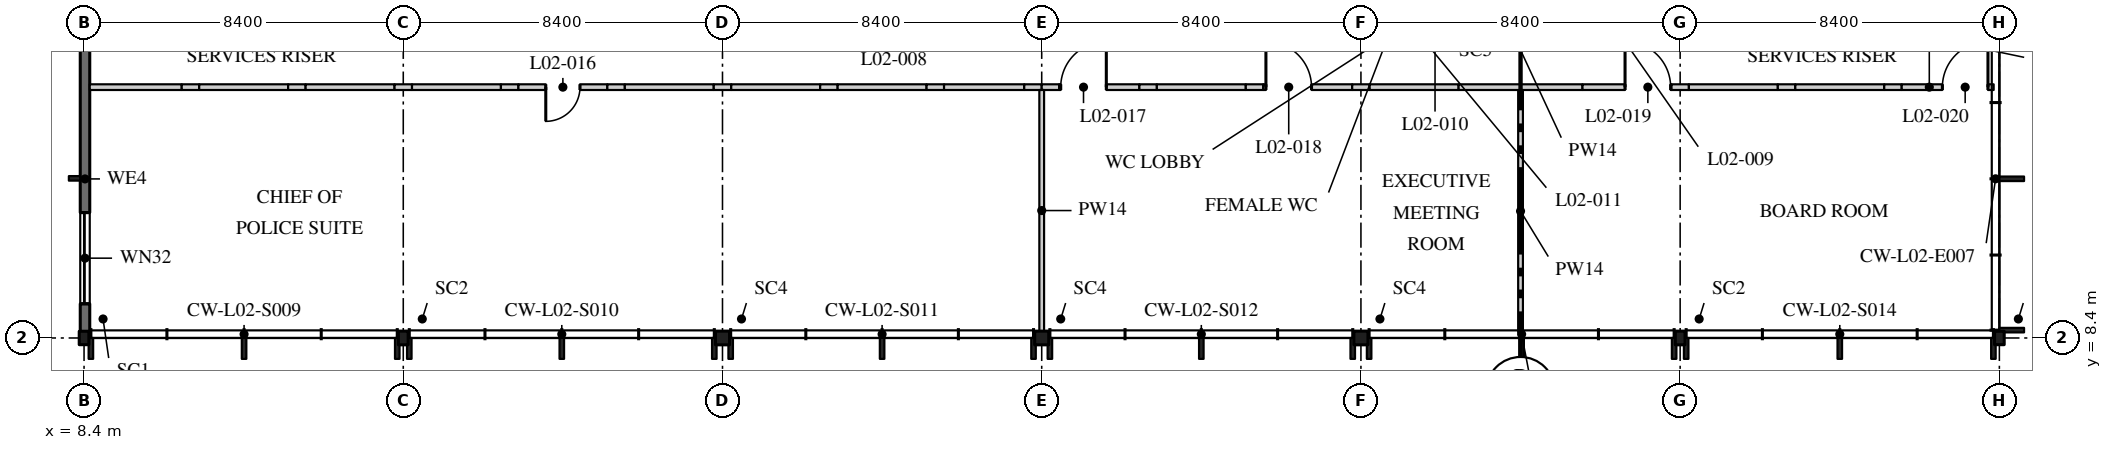
"""IFC4 building model, lengths in metres.
Left out: names, types, materials, properties, quantities, classifications, styles, units other than length and angle.
Written with IfcOpenShell. Run it as: python <this file> out.ifc"""

import sys

from ifc_helpers import new_model, si_unit, direction, frame, frame_2d, origin, origin_2d, place, context, subcontext, project, spatial, rectangle, i_section, extrude, element, fill, save


model = new_model("IFC4")
c1 = context("Model", 3, precision=1e-05, world=origin(), true_north=direction((0.0, 1.0)))
c2 = subcontext(c1, "Body", "Model", "MODEL_VIEW")
j1 = project(units=[si_unit("LENGTHUNIT", "METRE"), si_unit("PLANEANGLEUNIT", "RADIAN")], contexts=[c1])
p1 = place(None, origin())
s1 = spatial("IfcSite", under=j1, at=p1, CompositionType="ELEMENT")
p2 = place(p1, origin())
s2 = spatial("IfcBuilding", under=s1, at=p2, CompositionType="ELEMENT")
p3 = place(p2, frame((0.0, 0.0, 9.9)))
s3 = spatial("IfcBuildingStorey", under=s2, at=p3, CompositionType="ELEMENT", Elevation=9.9)
p4 = place(p3, frame((8.4, 8.4, 0.0), z_axis=(0.0, 0.0, 1.0), x_axis=(1.0, 0.0, 0.0)))
e1 = element("IfcColumn", 1, at=p4, inside=s3, PredefinedType="COLUMN", context=c2, shape_type="SweptSolid", body=[
    extrude(i_section(OverallWidth=0.254, OverallDepth=0.353, WebThickness=0.01, FlangeThickness=0.016, FilletRadius=0.015, at=origin_2d()), origin(), (0.0, 0.0, 1.0), 4.37),
])
p5 = place(p3, frame((16.8, 8.4, 0.0), z_axis=(0.0, 0.0, 1.0), x_axis=(1.0, 0.0, 0.0)))
e2 = element("IfcColumn", 2, at=p5, inside=s3, PredefinedType="COLUMN", context=c2, shape_type="SweptSolid", body=[
    extrude(i_section(OverallWidth=0.257, OverallDepth=0.361, WebThickness=0.011, FlangeThickness=0.02, FilletRadius=0.015, at=origin_2d()), origin(), (0.0, 0.0, 1.0), 4.37),
])
for number, where, z_axis, x_axis in (
    (3, (25.2, 8.4, 0.0), (0.0, 0.0, 1.0), (1.0, 0.0, 0.0)),
    (4, (33.6, 8.4, 0.0), (0.0, 0.0, 1.0), (1.0, 0.0, 0.0)),
    (5, (42.0, 8.4, 0.0), (0.0, 0.0, 1.0), (1.0, 0.0, 0.0)),
):
    element("IfcColumn", number, at=place(p3, frame(where, z_axis=z_axis, x_axis=x_axis)), inside=s3, PredefinedType="COLUMN", context=c2, shape_type="SweptSolid", body=[
        extrude(i_section(OverallWidth=0.371, OverallDepth=0.361, WebThickness=0.012, FlangeThickness=0.02, FilletRadius=0.015, at=origin_2d()), origin(), (0.0, 0.0, 1.0), 4.37),
    ])
p6 = place(p3, frame((50.4, 8.4, 0.0), z_axis=(0.0, 0.0, 1.0), x_axis=(1.0, 0.0, 0.0)))
e6 = element("IfcColumn", 6, at=p6, inside=s3, PredefinedType="COLUMN", context=c2, shape_type="SweptSolid", body=[
    extrude(i_section(OverallWidth=0.257, OverallDepth=0.361, WebThickness=0.011, FlangeThickness=0.02, FilletRadius=0.015, at=origin_2d()), origin(), (0.0, 0.0, 1.0), 4.37),
])
p7 = place(p3, frame((58.8, 8.4, 0.0), z_axis=(0.0, 0.0, 1.0), x_axis=(1.0, 0.0, 0.0)))
e7 = element("IfcColumn", 7, at=p7, inside=s3, PredefinedType="COLUMN", context=c2, shape_type="SweptSolid", body=[
    extrude(i_section(OverallWidth=0.254, OverallDepth=0.353, WebThickness=0.01, FlangeThickness=0.016, FilletRadius=0.015, at=origin_2d()), origin(), (0.0, 0.0, 1.0), 4.37),
])
p8 = place(p3, frame((8.55, 15.0, 0.0), z_axis=(0.0, 0.0, 1.0), x_axis=(1.0, 0.0, 0.0)))
e8 = element("IfcWall", 8, at=p8, inside=s3, PredefinedType="PARTITIONING", context=c2, shape_type="SweptSolid", body=[
    extrude(rectangle(XDim=2.42, YDim=0.15, at=frame_2d((1.21, 0.0))), origin(), (0.0, 0.0, 1.0), 4.37),
])
p9 = place(p3, frame((10.97, 15.0, 0.0), z_axis=(0.0, 0.0, 1.0), x_axis=(1.0, 0.0, 0.0)))
e9 = element("IfcWall", 9, at=p9, inside=s3, PredefinedType="PARTITIONING", context=c2, shape_type="SweptSolid", body=[
    extrude(rectangle(XDim=0.46, YDim=0.15, at=frame_2d((0.23, 0.0))), origin(), (0.0, 0.0, 1.0), 3.895),
])
p10 = place(p3, frame((11.43, 15.0, 0.0), z_axis=(0.0, 0.0, 1.0), x_axis=(1.0, 0.0, 0.0)))
e10 = element("IfcWall", 10, at=p10, inside=s3, PredefinedType="PARTITIONING", context=c2, shape_type="SweptSolid", body=[
    extrude(rectangle(XDim=2.34, YDim=0.15, at=frame_2d((1.17, 0.0))), origin(), (0.0, 0.0, 1.0), 4.37),
])
p11 = place(p3, frame((13.77, 15.0, 0.0), z_axis=(0.0, 0.0, 1.0), x_axis=(1.0, 0.0, 0.0)))
e11 = element("IfcWall", 11, at=p11, inside=s3, PredefinedType="PARTITIONING", context=c2, shape_type="SweptSolid", body=[
    extrude(rectangle(XDim=0.46, YDim=0.15, at=frame_2d((0.23, 0.0))), origin(), (0.0, 0.0, 1.0), 3.895),
])
p12 = place(p3, frame((14.23, 15.0, 0.0), z_axis=(0.0, 0.0, 1.0), x_axis=(1.0, 0.0, 0.0)))
e12 = element("IfcWall", 12, at=p12, inside=s3, PredefinedType="PARTITIONING", context=c2, shape_type="SweptSolid", body=[
    extrude(rectangle(XDim=2.34, YDim=0.15, at=frame_2d((1.17, 0.0))), origin(), (0.0, 0.0, 1.0), 4.37),
])
p13 = place(p3, frame((16.57, 15.0, 0.0), z_axis=(0.0, 0.0, 1.0), x_axis=(1.0, 0.0, 0.0)))
e13 = element("IfcWall", 13, at=p13, inside=s3, PredefinedType="PARTITIONING", context=c2, shape_type="SweptSolid", body=[
    extrude(rectangle(XDim=0.46, YDim=0.15, at=frame_2d((0.23, 0.0))), origin(), (0.0, 0.0, 1.0), 3.746),
])
p14 = place(p3, frame((17.03, 15.0, 0.0), z_axis=(0.0, 0.0, 1.0), x_axis=(1.0, 0.0, 0.0)))
e14 = element("IfcWall", 14, at=p14, inside=s3, PredefinedType="PARTITIONING", context=c2, shape_type="SweptSolid", body=[
    extrude(rectangle(XDim=2.34, YDim=0.15, at=frame_2d((1.17, 0.0))), origin(), (0.0, 0.0, 1.0), 4.37),
])
p15 = place(p3, frame((19.37, 15.0, 0.0), z_axis=(0.0, 0.0, 1.0), x_axis=(1.0, 0.0, 0.0)))
e15 = element("IfcWall", 15, at=p15, inside=s3, PredefinedType="PARTITIONING", context=c2, shape_type="SweptSolid", body=[
    extrude(rectangle(XDim=0.46, YDim=0.15, at=frame_2d((0.23, 0.0))), origin(), (0.0, 0.0, 1.0), 3.895),
])
p16 = place(p3, frame((19.83, 15.0, 0.0), z_axis=(0.0, 0.0, 1.0), x_axis=(1.0, 0.0, 0.0)))
e16 = element("IfcWall", 16, at=p16, inside=s3, PredefinedType="PARTITIONING", context=c2, shape_type="SweptSolid", body=[
    extrude(rectangle(XDim=2.34, YDim=0.15, at=frame_2d((1.17, 0.0))), origin(), (0.0, 0.0, 1.0), 4.37),
])
p17 = place(p16, frame((0.72, 0.0, 0.0)))
e17 = element("IfcOpeningElement", 17, at=p17, cuts=e16, PredefinedType="OPENING", context=c2, shape_type="SweptSolid", body=[
    extrude(rectangle(XDim=0.9, YDim=2.1, at=frame_2d((0.45, 1.05))), frame((0.0, 0.085, 0.0), z_axis=(0.0, -1.0, 0.0), x_axis=(1.0, 0.0, 0.0)), (0.0, 0.0, 1.0), 0.17),
])
p18 = place(p3, frame((22.17, 15.0, 0.0), z_axis=(0.0, 0.0, 1.0), x_axis=(1.0, 0.0, 0.0)))
e18 = element("IfcWall", 18, at=p18, inside=s3, PredefinedType="PARTITIONING", context=c2, shape_type="SweptSolid", body=[
    extrude(rectangle(XDim=0.46, YDim=0.15, at=frame_2d((0.23, 0.0))), origin(), (0.0, 0.0, 1.0), 3.895),
])
p19 = place(p3, frame((22.63, 15.0, 0.0), z_axis=(0.0, 0.0, 1.0), x_axis=(1.0, 0.0, 0.0)))
e19 = element("IfcWall", 19, at=p19, inside=s3, PredefinedType="PARTITIONING", context=c2, shape_type="SweptSolid", body=[
    extrude(rectangle(XDim=2.34, YDim=0.15, at=frame_2d((1.17, 0.0))), origin(), (0.0, 0.0, 1.0), 4.37),
])
p20 = place(p3, frame((24.97, 15.0, 0.0), z_axis=(0.0, 0.0, 1.0), x_axis=(1.0, 0.0, 0.0)))
e20 = element("IfcWall", 20, at=p20, inside=s3, PredefinedType="PARTITIONING", context=c2, shape_type="SweptSolid", body=[
    extrude(rectangle(XDim=0.46, YDim=0.15, at=frame_2d((0.23, 0.0))), origin(), (0.0, 0.0, 1.0), 3.746),
])
p21 = place(p3, frame((25.43, 15.0, 0.0), z_axis=(0.0, 0.0, 1.0), x_axis=(1.0, 0.0, 0.0)))
e21 = element("IfcWall", 21, at=p21, inside=s3, PredefinedType="PARTITIONING", context=c2, shape_type="SweptSolid", body=[
    extrude(rectangle(XDim=2.34, YDim=0.15, at=frame_2d((1.17, 0.0))), origin(), (0.0, 0.0, 1.0), 4.37),
])
p22 = place(p3, frame((27.77, 15.0, 0.0), z_axis=(0.0, 0.0, 1.0), x_axis=(1.0, 0.0, 0.0)))
e22 = element("IfcWall", 22, at=p22, inside=s3, PredefinedType="PARTITIONING", context=c2, shape_type="SweptSolid", body=[
    extrude(rectangle(XDim=0.46, YDim=0.15, at=frame_2d((0.23, 0.0))), origin(), (0.0, 0.0, 1.0), 3.895),
])
p23 = place(p3, frame((28.23, 15.0, 0.0), z_axis=(0.0, 0.0, 1.0), x_axis=(1.0, 0.0, 0.0)))
e23 = element("IfcWall", 23, at=p23, inside=s3, PredefinedType="PARTITIONING", context=c2, shape_type="SweptSolid", body=[
    extrude(rectangle(XDim=2.34, YDim=0.15, at=frame_2d((1.17, 0.0))), origin(), (0.0, 0.0, 1.0), 4.37),
])
p24 = place(p3, frame((30.57, 15.0, 0.0), z_axis=(0.0, 0.0, 1.0), x_axis=(1.0, 0.0, 0.0)))
e24 = element("IfcWall", 24, at=p24, inside=s3, PredefinedType="PARTITIONING", context=c2, shape_type="SweptSolid", body=[
    extrude(rectangle(XDim=0.46, YDim=0.15, at=frame_2d((0.23, 0.0))), origin(), (0.0, 0.0, 1.0), 3.895),
])
p25 = place(p3, frame((31.03, 15.0, 0.0), z_axis=(0.0, 0.0, 1.0), x_axis=(1.0, 0.0, 0.0)))
e25 = element("IfcWall", 25, at=p25, inside=s3, PredefinedType="PARTITIONING", context=c2, shape_type="SweptSolid", body=[
    extrude(rectangle(XDim=2.11, YDim=0.15, at=frame_2d((1.055, 0.0))), origin(), (0.0, 0.0, 1.0), 4.37),
])
p26 = place(p3, frame((33.14, 15.0, 0.0), z_axis=(0.0, 0.0, 1.0), x_axis=(1.0, 0.0, 0.0)))
e26 = element("IfcWall", 26, at=p26, inside=s3, PredefinedType="PARTITIONING", context=c2, shape_type="SweptSolid", body=[
    extrude(rectangle(XDim=0.46, YDim=0.15, at=frame_2d((0.23, 0.0))), origin(), (0.0, 0.0, 1.0), 3.746),
])
p27 = place(p3, frame((33.6, 15.0, 0.0), z_axis=(0.0, 0.0, 1.0), x_axis=(1.0, 0.0, 0.0)))
e27 = element("IfcWall", 27, at=p27, inside=s3, PredefinedType="PARTITIONING", context=c2, shape_type="SweptSolid", body=[
    extrude(rectangle(XDim=0.46, YDim=0.15, at=frame_2d((0.23, 0.0))), origin(), (0.0, 0.0, 1.0), 3.746),
])
p28 = place(p3, frame((34.06, 15.0, 0.0), z_axis=(0.0, 0.0, 1.0), x_axis=(1.0, 0.0, 0.0)))
e28 = element("IfcWall", 28, at=p28, inside=s3, PredefinedType="PARTITIONING", context=c2, shape_type="SweptSolid", body=[
    extrude(rectangle(XDim=2.11, YDim=0.15, at=frame_2d((1.055, 0.0))), origin(), (0.0, 0.0, 1.0), 4.37),
])
p29 = place(p28, frame((0.04, 0.0, 0.0)))
e29 = element("IfcOpeningElement", 29, at=p29, cuts=e28, PredefinedType="OPENING", context=c2, shape_type="SweptSolid", body=[
    extrude(rectangle(XDim=1.2, YDim=2.4, at=frame_2d((0.6, 1.2))), frame((0.0, 0.085, 0.0), z_axis=(0.0, -1.0, 0.0), x_axis=(1.0, 0.0, 0.0)), (0.0, 0.0, 1.0), 0.17),
])
p30 = place(p3, frame((36.17, 15.0, 0.0), z_axis=(0.0, 0.0, 1.0), x_axis=(1.0, 0.0, 0.0)))
e30 = element("IfcWall", 30, at=p30, inside=s3, PredefinedType="PARTITIONING", context=c2, shape_type="SweptSolid", body=[
    extrude(rectangle(XDim=0.46, YDim=0.15, at=frame_2d((0.23, 0.0))), origin(), (0.0, 0.0, 1.0), 3.895),
])
p31 = place(p3, frame((36.63, 15.0, 0.0), z_axis=(0.0, 0.0, 1.0), x_axis=(1.0, 0.0, 0.0)))
e31 = element("IfcWall", 31, at=p31, inside=s3, PredefinedType="PARTITIONING", context=c2, shape_type="SweptSolid", body=[
    extrude(rectangle(XDim=2.34, YDim=0.15, at=frame_2d((1.17, 0.0))), origin(), (0.0, 0.0, 1.0), 4.37),
])
p32 = place(p3, frame((38.97, 15.0, 0.0), z_axis=(0.0, 0.0, 1.0), x_axis=(1.0, 0.0, 0.0)))
e32 = element("IfcWall", 32, at=p32, inside=s3, PredefinedType="PARTITIONING", context=c2, shape_type="SweptSolid", body=[
    extrude(rectangle(XDim=0.46, YDim=0.15, at=frame_2d((0.23, 0.0))), origin(), (0.0, 0.0, 1.0), 3.895),
])
p33 = place(p3, frame((39.43, 15.0, 0.0), z_axis=(0.0, 0.0, 1.0), x_axis=(1.0, 0.0, 0.0)))
e33 = element("IfcWall", 33, at=p33, inside=s3, PredefinedType="PARTITIONING", context=c2, shape_type="SweptSolid", body=[
    extrude(rectangle(XDim=2.34, YDim=0.15, at=frame_2d((1.17, 0.0))), origin(), (0.0, 0.0, 1.0), 4.37),
])
p34 = place(p33, frame((0.07, 0.0, 0.0)))
e34 = element("IfcOpeningElement", 34, at=p34, cuts=e33, PredefinedType="OPENING", context=c2, shape_type="SweptSolid", body=[
    extrude(rectangle(XDim=1.2, YDim=2.4, at=frame_2d((0.6, 1.2))), frame((0.0, 0.085, 0.0), z_axis=(0.0, -1.0, 0.0), x_axis=(1.0, 0.0, 0.0)), (0.0, 0.0, 1.0), 0.17),
])
p35 = place(p3, frame((41.77, 15.0, 0.0), z_axis=(0.0, 0.0, 1.0), x_axis=(1.0, 0.0, 0.0)))
e35 = element("IfcWall", 35, at=p35, inside=s3, PredefinedType="PARTITIONING", context=c2, shape_type="SweptSolid", body=[
    extrude(rectangle(XDim=0.46, YDim=0.15, at=frame_2d((0.23, 0.0))), origin(), (0.0, 0.0, 1.0), 3.746),
])
p36 = place(p3, frame((42.23, 15.0, 0.0), z_axis=(0.0, 0.0, 1.0), x_axis=(1.0, 0.0, 0.0)))
e36 = element("IfcWall", 36, at=p36, inside=s3, PredefinedType="PARTITIONING", context=c2, shape_type="SweptSolid", body=[
    extrude(rectangle(XDim=2.34, YDim=0.15, at=frame_2d((1.17, 0.0))), origin(), (0.0, 0.0, 1.0), 4.37),
])
p37 = place(p3, frame((44.57, 15.0, 0.0), z_axis=(0.0, 0.0, 1.0), x_axis=(1.0, 0.0, 0.0)))
e37 = element("IfcWall", 37, at=p37, inside=s3, PredefinedType="PARTITIONING", context=c2, shape_type="SweptSolid", body=[
    extrude(rectangle(XDim=1.63, YDim=0.15, at=frame_2d((0.815, 0.0))), origin(), (0.0, 0.0, 1.0), 3.895),
])
p38 = place(p3, frame((46.2, 15.0, 0.0), z_axis=(0.0, 0.0, 1.0), x_axis=(1.0, 0.0, 0.0)))
e38 = element("IfcWall", 38, at=p38, inside=s3, PredefinedType="PARTITIONING", context=c2, shape_type="SweptSolid", body=[
    extrude(rectangle(XDim=1.63, YDim=0.15, at=frame_2d((0.815, 0.0))), origin(), (0.0, 0.0, 1.0), 3.895),
])
p39 = place(p3, frame((47.83, 15.0, 0.0), z_axis=(0.0, 0.0, 1.0), x_axis=(1.0, 0.0, 0.0)))
e39 = element("IfcWall", 39, at=p39, inside=s3, PredefinedType="PARTITIONING", context=c2, shape_type="SweptSolid", body=[
    extrude(rectangle(XDim=2.34, YDim=0.15, at=frame_2d((1.17, 0.0))), origin(), (0.0, 0.0, 1.0), 4.37),
])
p40 = place(p39, frame((1.12, 0.0, 0.0)))
e40 = element("IfcOpeningElement", 40, at=p40, cuts=e39, PredefinedType="OPENING", context=c2, shape_type="SweptSolid", body=[
    extrude(rectangle(XDim=1.2, YDim=2.4, at=frame_2d((0.6, 1.2))), frame((0.0, 0.085, 0.0), z_axis=(0.0, -1.0, 0.0), x_axis=(1.0, 0.0, 0.0)), (0.0, 0.0, 1.0), 0.17),
])
p41 = place(p3, frame((50.17, 15.0, 0.0), z_axis=(0.0, 0.0, 1.0), x_axis=(1.0, 0.0, 0.0)))
e41 = element("IfcWall", 41, at=p41, inside=s3, PredefinedType="PARTITIONING", context=c2, shape_type="SweptSolid", body=[
    extrude(rectangle(XDim=0.46, YDim=0.15, at=frame_2d((0.23, 0.0))), origin(), (0.0, 0.0, 1.0), 3.746),
])
p42 = place(p3, frame((50.63, 15.0, 0.0), z_axis=(0.0, 0.0, 1.0), x_axis=(1.0, 0.0, 0.0)))
e42 = element("IfcWall", 42, at=p42, inside=s3, PredefinedType="PARTITIONING", context=c2, shape_type="SweptSolid", body=[
    extrude(rectangle(XDim=2.34, YDim=0.15, at=frame_2d((1.17, 0.0))), origin(), (0.0, 0.0, 1.0), 4.37),
])
p43 = place(p3, frame((52.97, 15.0, 0.0), z_axis=(0.0, 0.0, 1.0), x_axis=(1.0, 0.0, 0.0)))
e43 = element("IfcWall", 43, at=p43, inside=s3, PredefinedType="PARTITIONING", context=c2, shape_type="SweptSolid", body=[
    extrude(rectangle(XDim=0.46, YDim=0.15, at=frame_2d((0.23, 0.0))), origin(), (0.0, 0.0, 1.0), 3.895),
])
p44 = place(p3, frame((53.43, 15.0, 0.0), z_axis=(0.0, 0.0, 1.0), x_axis=(1.0, 0.0, 0.0)))
e44 = element("IfcWall", 44, at=p44, inside=s3, PredefinedType="PARTITIONING", context=c2, shape_type="SweptSolid", body=[
    extrude(rectangle(XDim=2.34, YDim=0.15, at=frame_2d((1.17, 0.0))), origin(), (0.0, 0.0, 1.0), 4.37),
])
p45 = place(p3, frame((55.77, 15.0, 0.0), z_axis=(0.0, 0.0, 1.0), x_axis=(1.0, 0.0, 0.0)))
e45 = element("IfcWall", 45, at=p45, inside=s3, PredefinedType="PARTITIONING", context=c2, shape_type="SweptSolid", body=[
    extrude(rectangle(XDim=0.46, YDim=0.15, at=frame_2d((0.23, 0.0))), origin(), (0.0, 0.0, 1.0), 3.895),
])
p46 = place(p3, frame((56.23, 15.0, 0.0), z_axis=(0.0, 0.0, 1.0), x_axis=(1.0, 0.0, 0.0)))
e46 = element("IfcWall", 46, at=p46, inside=s3, PredefinedType="PARTITIONING", context=c2, shape_type="SweptSolid", body=[
    extrude(rectangle(XDim=2.42, YDim=0.15, at=frame_2d((1.21, 0.0))), origin(), (0.0, 0.0, 1.0), 4.37),
])
p47 = place(p46, frame((1.07, 0.0, 0.0)))
e47 = element("IfcOpeningElement", 47, at=p47, cuts=e46, PredefinedType="OPENING", context=c2, shape_type="SweptSolid", body=[
    extrude(rectangle(XDim=1.2, YDim=2.4, at=frame_2d((0.6, 1.2))), frame((0.0, 0.085, 0.0), z_axis=(0.0, -1.0, 0.0), x_axis=(1.0, 0.0, 0.0)), (0.0, 0.0, 1.0), 0.17),
])
p48 = place(p3, frame((33.6, 8.581, 0.0), z_axis=(0.0, 0.0, 1.0), x_axis=(0.0, 1.0, 0.0)))
e48 = element("IfcWall", 48, at=p48, inside=s3, PredefinedType="PARTITIONING", context=c2, shape_type="SweptSolid", body=[
    extrude(rectangle(XDim=6.344, YDim=0.125, at=frame_2d((3.172, 0.0))), origin(), (0.0, 0.0, 1.0), 3.746),
])
p49 = place(p3, frame((46.2, 8.55, 0.0), z_axis=(0.0, 0.0, 1.0), x_axis=(0.0, 1.0, 0.0)))
e49 = element("IfcWall", 49, at=p49, inside=s3, PredefinedType="PARTITIONING", context=c2, shape_type="SweptSolid", body=[
    extrude(rectangle(XDim=6.375, YDim=0.125, at=frame_2d((3.188, 0.0))), origin(), (0.0, 0.0, 1.0), 4.37),
])
p50 = place(p3, frame((8.425, 16.6, 0.0), z_axis=(0.0, 0.0, 1.0), x_axis=(0.0, -1.0, 0.0)))
e50 = element("IfcWall", 50, at=p50, inside=s3, PredefinedType="SOLIDWALL", context=c2, shape_type="SweptSolid", body=[
    extrude(rectangle(XDim=8.03, YDim=0.25, at=frame_2d((4.015, 0.0))), origin(), (0.0, 0.0, 1.0), 3.746),
])
p51 = place(p50, frame((4.9, 0.0, 0.6)))
e51 = element("IfcOpeningElement", 51, at=p51, cuts=e50, PredefinedType="OPENING", context=c2, shape_type="SweptSolid", body=[
    extrude(rectangle(XDim=2.4, YDim=2.55, at=frame_2d((1.2, 1.275))), frame((0.0, 0.135, 0.0), z_axis=(0.0, -1.0, 0.0), x_axis=(1.0, 0.0, 0.0)), (0.0, 0.0, 1.0), 0.27),
])
p52 = place(p17, frame((0.9, 0.0, 0.0), z_axis=(0.0, 0.0, 1.0), x_axis=(-1.0, 0.0, 0.0)))
e52 = element("IfcDoor", 52, at=p52, inside=s3, OperationType="SINGLE_SWING_LEFT", PredefinedType="DOOR", context=c2, shape_type="SweptSolid", body=[
    extrude(rectangle(XDim=0.9, YDim=2.1, at=frame_2d((0.45, 1.05))), frame((0.0, 0.025, 0.0), z_axis=(0.0, -1.0, 0.0), x_axis=(1.0, 0.0, 0.0)), (0.0, 0.0, 1.0), 0.05),
])
fill(e17, e52)
p53 = place(p29, origin())
e53 = element("IfcDoor", 53, at=p53, inside=s3, OperationType="SINGLE_SWING_LEFT", PredefinedType="DOOR", context=c2, shape_type="SweptSolid", body=[
    extrude(rectangle(XDim=1.2, YDim=2.4, at=frame_2d((0.6, 1.2))), frame((0.0, 0.025, 0.0), z_axis=(0.0, -1.0, 0.0), x_axis=(1.0, 0.0, 0.0)), (0.0, 0.0, 1.0), 0.05),
])
fill(e29, e53)
p54 = place(p34, origin())
e54 = element("IfcDoor", 54, at=p54, inside=s3, OperationType="SINGLE_SWING_RIGHT", PredefinedType="DOOR", context=c2, shape_type="SweptSolid", body=[
    extrude(rectangle(XDim=1.2, YDim=2.4, at=frame_2d((0.6, 1.2))), frame((0.0, 0.025, 0.0), z_axis=(0.0, -1.0, 0.0), x_axis=(1.0, 0.0, 0.0)), (0.0, 0.0, 1.0), 0.05),
])
fill(e34, e54)
p55 = place(p40, origin())
e55 = element("IfcDoor", 55, at=p55, inside=s3, OperationType="SINGLE_SWING_RIGHT", PredefinedType="DOOR", context=c2, shape_type="SweptSolid", body=[
    extrude(rectangle(XDim=1.2, YDim=2.4, at=frame_2d((0.6, 1.2))), frame((0.0, 0.025, 0.0), z_axis=(0.0, -1.0, 0.0), x_axis=(1.0, 0.0, 0.0)), (0.0, 0.0, 1.0), 0.05),
])
fill(e40, e55)
p56 = place(p47, origin())
e56 = element("IfcDoor", 56, at=p56, inside=s3, OperationType="SINGLE_SWING_LEFT", PredefinedType="DOOR", context=c2, shape_type="SweptSolid", body=[
    extrude(rectangle(XDim=1.2, YDim=2.4, at=frame_2d((0.6, 1.2))), frame((0.0, 0.025, 0.0), z_axis=(0.0, -1.0, 0.0), x_axis=(1.0, 0.0, 0.0)), (0.0, 0.0, 1.0), 0.05),
])
fill(e47, e56)
p57 = place(p51, origin())
e57 = element("IfcWindow", 57, at=p57, inside=s3, PartitioningType="SINGLE_PANEL", PredefinedType="WINDOW", context=c2, shape_type="SweptSolid", body=[
    extrude(rectangle(XDim=2.4, YDim=2.55, at=frame_2d((1.2, 1.275))), frame((0.0, 0.04, 0.0), z_axis=(0.0, -1.0, 0.0), x_axis=(1.0, 0.0, 0.0)), (0.0, 0.0, 1.0), 0.08),
])
fill(e51, e57)
save(model, sys.argv[1])
